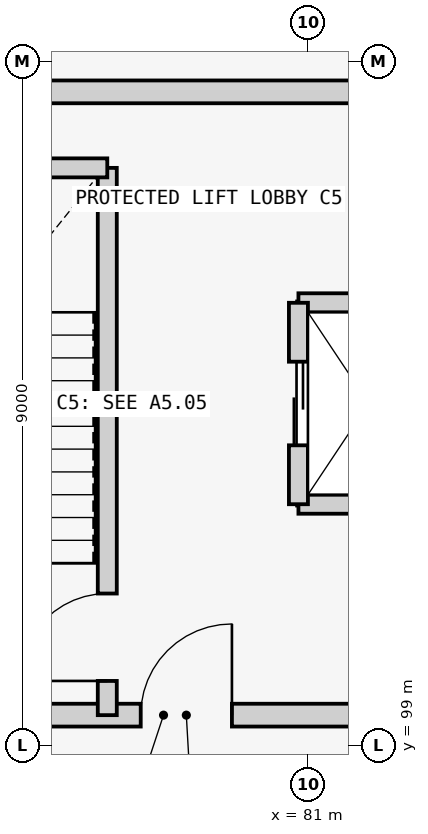
"""IFC4 building model, lengths in metres.
Left out: names, types, materials, properties, quantities, classifications, styles, units other than length and angle.
Written with IfcOpenShell. Run it as: python <this file> out.ifc"""

import sys

from ifc_helpers import new_model, si_unit, direction, frame, frame_2d, origin, place, context, subcontext, project, spatial, rectangle, extrude, element, fill, save


model = new_model("IFC4")
c1 = context("Model", 3, precision=1e-05, world=origin(), true_north=direction((0.0, 1.0)))
c2 = subcontext(c1, "Body", "Model", "MODEL_VIEW")
j1 = project(units=[si_unit("LENGTHUNIT", "METRE"), si_unit("PLANEANGLEUNIT", "RADIAN")], contexts=[c1])
p1 = place(None, origin())
s1 = spatial("IfcSite", under=j1, at=p1, CompositionType="ELEMENT")
p2 = place(p1, origin())
s2 = spatial("IfcBuilding", under=s1, at=p2, CompositionType="ELEMENT")
p3 = place(p2, frame((0.0, 0.0, 4.2)))
s3 = spatial("IfcBuildingStorey", under=s2, at=p3, CompositionType="ELEMENT", Elevation=4.2)
p4 = place(p3, frame((74.0, 99.4, 0.0), z_axis=(0.0, 0.0, 1.0), x_axis=(1.0, 0.0, 0.0)))
e1 = element("IfcWall", 1, at=p4, inside=s3, PredefinedType="SHEAR", context=c2, shape_type="SweptSolid", body=[
    extrude(rectangle(XDim=10.2, YDim=0.3, at=frame_2d((5.1, 0.0))), origin(), (0.0, 0.0, 1.0), 3.945),
])
p5 = place(p4, frame((4.8, 0.0, 0.0)))
e2 = element("IfcOpeningElement", 2, at=p5, cuts=e1, PredefinedType="OPENING", context=c2, shape_type="SweptSolid", body=[
    extrude(rectangle(XDim=1.2, YDim=2.15, at=frame_2d((0.6, 1.075))), frame((0.0, 0.16, 0.0), z_axis=(0.0, -1.0, 0.0), x_axis=(1.0, 0.0, 0.0)), (0.0, 0.0, 1.0), 0.32),
])
p6 = place(p3, frame((84.2, 107.6, 0.0), z_axis=(0.0, 0.0, 1.0), x_axis=(-1.0, 0.0, 0.0)))
e3 = element("IfcWall", 3, at=p6, inside=s3, PredefinedType="SHEAR", context=c2, shape_type="SweptSolid", body=[
    extrude(rectangle(XDim=10.2, YDim=0.3, at=frame_2d((5.1, 0.0))), origin(), (0.0, 0.0, 1.0), 3.945),
])
p7 = place(p3, frame((78.36, 99.4, 0.0), z_axis=(0.0, 0.0, 1.0), x_axis=(0.0, 1.0, 0.0)))
e4 = element("IfcWall", 4, at=p7, inside=s3, PredefinedType="SHEAR", context=c2, shape_type="SweptSolid", body=[
    extrude(rectangle(XDim=7.2, YDim=0.25, at=frame_2d((3.6, 0.0))), origin(), (0.0, 0.0, 1.0), 3.945),
])
p8 = place(p7, frame((0.45, 0.0, 0.0)))
e5 = element("IfcOpeningElement", 5, at=p8, cuts=e4, PredefinedType="OPENING", context=c2, shape_type="SweptSolid", body=[
    extrude(rectangle(XDim=1.15, YDim=2.15, at=frame_2d((0.575, 1.075))), frame((0.0, 0.135, 0.0), z_axis=(0.0, -1.0, 0.0), x_axis=(1.0, 0.0, 0.0)), (0.0, 0.0, 1.0), 0.27),
])
p9 = place(p3, frame((74.0, 106.6, 0.0), z_axis=(0.0, 0.0, 1.0), x_axis=(1.0, 0.0, 0.0)))
e6 = element("IfcWall", 6, at=p9, inside=s3, PredefinedType="SHEAR", context=c2, shape_type="SweptSolid", body=[
    extrude(rectangle(XDim=4.36, YDim=0.25, at=frame_2d((2.18, 0.0))), origin(), (0.0, 0.0, 1.0), 3.945),
])
for number, where, z_axis, x_axis in (
    (7, (80.875, 102.175, 0.0), (0.0, 0.0, 1.0), (1.0, 0.0, 0.0)),
    (8, (80.875, 104.825, 0.0), (0.0, 0.0, 1.0), (1.0, 0.0, 0.0)),
):
    element("IfcWall", number, at=place(p3, frame(where, z_axis=z_axis, x_axis=x_axis)), inside=s3, PredefinedType="SHEAR", context=c2, shape_type="SweptSolid", body=[
        extrude(rectangle(XDim=1.85, YDim=0.25, at=frame_2d((0.925, 0.0))), origin(), (0.0, 0.0, 1.0), 3.945),
    ])
p10 = place(p3, frame((80.875, 102.175, 0.0), z_axis=(0.0, 0.0, 1.0), x_axis=(0.0, 1.0, 0.0)))
e9 = element("IfcWall", 9, at=p10, inside=s3, PredefinedType="SHEAR", context=c2, shape_type="SweptSolid", body=[
    extrude(rectangle(XDim=2.65, YDim=0.25, at=frame_2d((1.325, 0.0))), origin(), (0.0, 0.0, 1.0), 3.945),
])
p11 = place(p10, frame((0.775, 0.0, 0.0)))
e10 = element("IfcOpeningElement", 10, at=p11, cuts=e9, PredefinedType="OPENING", context=c2, shape_type="SweptSolid", body=[
    extrude(rectangle(XDim=1.1, YDim=2.15, at=frame_2d((0.55, 1.075))), frame((0.0, 0.135, 0.0), z_axis=(0.0, -1.0, 0.0), x_axis=(1.0, 0.0, 0.0)), (0.0, 0.0, 1.0), 0.27),
])
p12 = place(p8, origin())
e11 = element("IfcDoor", 11, at=p12, inside=s3, OperationType="SINGLE_SWING_LEFT", PredefinedType="DOOR", context=c2, shape_type="SweptSolid", body=[
    extrude(rectangle(XDim=1.15, YDim=2.15, at=frame_2d((0.575, 1.075))), frame((0.0, 0.025, 0.0), z_axis=(0.0, -1.0, 0.0), x_axis=(1.0, 0.0, 0.0)), (0.0, 0.0, 1.0), 0.05),
])
fill(e5, e11)
p13 = place(p5, origin())
e12 = element("IfcDoor", 12, at=p13, inside=s3, OperationType="SINGLE_SWING_RIGHT", PredefinedType="DOOR", context=c2, shape_type="SweptSolid", body=[
    extrude(rectangle(XDim=1.2, YDim=2.15, at=frame_2d((0.6, 1.075))), frame((0.0, 0.025, 0.0), z_axis=(0.0, -1.0, 0.0), x_axis=(1.0, 0.0, 0.0)), (0.0, 0.0, 1.0), 0.05),
])
fill(e2, e12)
p14 = place(p11, origin())
e13 = element("IfcDoor", 13, at=p14, inside=s3, OperationType="DOUBLE_DOOR_SLIDING", PredefinedType="USERDEFINED", context=c2, shape_type="SweptSolid", body=[
    extrude(rectangle(XDim=1.1, YDim=2.15, at=frame_2d((0.55, 1.075))), frame((0.0, 0.025, 0.0), z_axis=(0.0, -1.0, 0.0), x_axis=(1.0, 0.0, 0.0)), (0.0, 0.0, 1.0), 0.05),
])
fill(e10, e13)
save(model, sys.argv[1])
